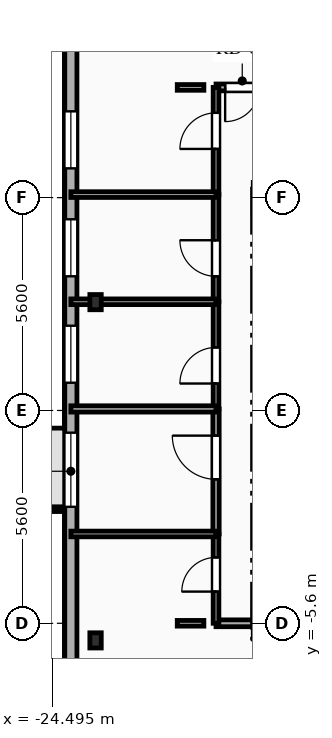
"""IFC4 building model, lengths in metres.
Left out: names, types, materials, properties, quantities, classifications, styles, units other than length and angle.
Written with IfcOpenShell. Run it as: python <this file> out.ifc"""

import sys

from ifc_helpers import new_model, si_unit, direction, frame, frame_2d, origin, origin_2d, place, context, subcontext, project, spatial, rectangle, i_section, extrude, element, fill, save


model = new_model("IFC4")
c1 = context("Model", 3, precision=1e-05, world=origin(), true_north=direction((0.0, 1.0)))
c2 = subcontext(c1, "Body", "Model", "MODEL_VIEW")
j1 = project(units=[si_unit("LENGTHUNIT", "METRE"), si_unit("PLANEANGLEUNIT", "RADIAN")], contexts=[c1])
p1 = place(None, origin())
s1 = spatial("IfcSite", under=j1, at=p1, CompositionType="ELEMENT")
p2 = place(p1, origin())
s2 = spatial("IfcBuilding", under=s1, at=p2, CompositionType="ELEMENT")
p3 = place(p2, frame((0.0, 0.0, 248.4)))
s3 = spatial("IfcBuildingStorey", under=s2, at=p3, CompositionType="ELEMENT", Elevation=248.4)
for number, where, z_axis, x_axis in (
    (1, (-23.35, 2.85, 0.0), (0.0, 0.0, 1.0), (1.0, 0.0, 0.0)),
    (2, (-23.35, -6.05, 0.0), (0.0, 0.0, 1.0), (1.0, 0.0, 0.0)),
):
    element("IfcColumn", number, at=place(p3, frame(where, z_axis=z_axis, x_axis=x_axis)), inside=s3, PredefinedType="COLUMN", context=c2, shape_type="SweptSolid", body=[
        extrude(i_section(OverallWidth=0.3, OverallDepth=0.4, WebThickness=0.013, FlangeThickness=0.024, FilletRadius=0.027, at=origin_2d()), origin(), (0.0, 0.0, 1.0), 3.35),
    ])
p4 = place(p3, frame((-24.0, -15.6, 0.0), z_axis=(0.0, 0.0, 1.0), x_axis=(0.0, 1.0, 0.0)))
e3 = element("IfcWall", 3, at=p4, inside=s3, PredefinedType="SOLIDWALL", context=c2, shape_type="SweptSolid", body=[
    extrude(rectangle(XDim=28.0, YDim=0.32, at=frame_2d((14.0, 0.0))), origin(), (0.0, 0.0, 1.0), 3.04),
])
p5 = place(p4, frame((13.065, 0.0, 0.85)))
e4 = element("IfcOpeningElement", 4, at=p5, cuts=e3, PredefinedType="OPENING", context=c2, shape_type="SweptSolid", body=[
    extrude(rectangle(XDim=1.95, YDim=1.85, at=frame_2d((0.975, 0.925))), frame((0.0, 0.17, 0.0), z_axis=(0.0, -1.0, 0.0), x_axis=(1.0, 0.0, 0.0)), (0.0, 0.0, 1.0), 0.34),
])
p6 = place(p4, frame((16.33, 0.0, 0.85)))
e5 = element("IfcOpeningElement", 5, at=p6, cuts=e3, PredefinedType="OPENING", context=c2, shape_type="SweptSolid", body=[
    extrude(rectangle(XDim=1.5, YDim=1.85, at=frame_2d((0.75, 0.925))), frame((0.0, 0.17, 0.0), z_axis=(0.0, -1.0, 0.0), x_axis=(1.0, 0.0, 0.0)), (0.0, 0.0, 1.0), 0.34),
])
p7 = place(p4, frame((19.13, 0.0, 0.85)))
e6 = element("IfcOpeningElement", 6, at=p7, cuts=e3, PredefinedType="OPENING", context=c2, shape_type="SweptSolid", body=[
    extrude(rectangle(XDim=1.5, YDim=1.85, at=frame_2d((0.75, 0.925))), frame((0.0, 0.17, 0.0), z_axis=(0.0, -1.0, 0.0), x_axis=(1.0, 0.0, 0.0)), (0.0, 0.0, 1.0), 0.34),
])
p8 = place(p4, frame((21.97, 0.0, 0.85)))
e7 = element("IfcOpeningElement", 7, at=p8, cuts=e3, PredefinedType="OPENING", context=c2, shape_type="SweptSolid", body=[
    extrude(rectangle(XDim=1.5, YDim=1.85, at=frame_2d((0.75, 0.925))), frame((0.0, 0.17, 0.0), z_axis=(0.0, -1.0, 0.0), x_axis=(1.0, 0.0, 0.0)), (0.0, 0.0, 1.0), 0.34),
])
p9 = place(p3, frame((-18.8, 8.5, 0.0), z_axis=(0.0, 0.0, 1.0), x_axis=(-1.0, 0.0, 0.0)))
e8 = element("IfcWall", 8, at=p9, inside=s3, PredefinedType="PARTITIONING", context=c2, shape_type="SweptSolid", body=[
    extrude(rectangle(XDim=1.38, YDim=0.18, at=frame_2d((0.69, 0.0))), origin(), (0.0, 0.0, 1.0), 3.04),
])
p10 = place(p9, frame((0.24, 0.0, 0.0)))
e9 = element("IfcOpeningElement", 9, at=p10, cuts=e8, PredefinedType="OPENING", context=c2, shape_type="SweptSolid", body=[
    extrude(rectangle(XDim=0.9, YDim=2.1, at=frame_2d((0.45, 1.05))), frame((0.0, 0.1, 0.0), z_axis=(0.0, -1.0, 0.0), x_axis=(1.0, 0.0, 0.0)), (0.0, 0.0, 1.0), 0.2),
])
p11 = place(p3, frame((-20.5, 8.5, 0.0), z_axis=(0.0, 0.0, 1.0), x_axis=(-1.0, 0.0, 0.0)))
e10 = element("IfcWall", 10, at=p11, inside=s3, PredefinedType="PARTITIONING", context=c2, shape_type="SweptSolid", body=[
    extrude(rectangle(XDim=0.7, YDim=0.15, at=frame_2d((0.35, 0.0))), origin(), (0.0, 0.0, 1.0), 3.04),
])
p12 = place(p3, frame((-20.18, -5.6, 0.0), z_axis=(0.0, 0.0, 1.0), x_axis=(1.0, 0.0, 0.0)))
e11 = element("IfcWall", 11, at=p12, inside=s3, PredefinedType="PARTITIONING", context=c2, shape_type="SweptSolid", body=[
    extrude(rectangle(XDim=1.38, YDim=0.18, at=frame_2d((0.69, 0.0))), origin(), (0.0, 0.0, 1.0), 3.04),
])
p13 = place(p3, frame((-21.2, -5.6, 0.0), z_axis=(0.0, 0.0, 1.0), x_axis=(1.0, 0.0, 0.0)))
e12 = element("IfcWall", 12, at=p13, inside=s3, PredefinedType="PLUMBINGWALL", context=c2, shape_type="SweptSolid", body=[
    extrude(rectangle(XDim=0.7, YDim=0.15, at=frame_2d((0.35, 0.0))), origin(), (0.0, 0.0, 1.0), 3.04),
])
p14 = place(p3, frame((-20.18, -5.6, 0.0), z_axis=(0.0, 0.0, 1.0), x_axis=(0.0, 1.0, 0.0)))
e13 = element("IfcWall", 13, at=p14, inside=s3, PredefinedType="PLUMBINGWALL", context=c2, shape_type="SweptSolid", body=[
    extrude(rectangle(XDim=2.35, YDim=0.15, at=frame_2d((1.175, 0.0))), origin(), (0.0, 0.0, 1.0), 3.04),
])
p15 = place(p14, frame((0.834, 0.0, 0.0)))
e14 = element("IfcOpeningElement", 14, at=p15, cuts=e13, PredefinedType="OPENING", context=c2, shape_type="SweptSolid", body=[
    extrude(rectangle(XDim=0.9, YDim=2.1, at=frame_2d((0.45, 1.05))), frame((0.0, 0.085, 0.0), z_axis=(0.0, -1.0, 0.0), x_axis=(1.0, 0.0, 0.0)), (0.0, 0.0, 1.0), 0.17),
])
p16 = place(p3, frame((-20.18, -3.25, 0.0), z_axis=(0.0, 0.0, 1.0), x_axis=(0.0, 1.0, 0.0)))
e15 = element("IfcWall", 15, at=p16, inside=s3, PredefinedType="PARTITIONING", context=c2, shape_type="SweptSolid", body=[
    extrude(rectangle(XDim=3.29, YDim=0.165, at=frame_2d((1.645, 0.0))), origin(), (0.0, 0.0, 1.0), 3.04),
])
p17 = place(p16, frame((1.438, 0.0, 0.0)))
e16 = element("IfcOpeningElement", 16, at=p17, cuts=e15, PredefinedType="OPENING", context=c2, shape_type="SweptSolid", body=[
    extrude(rectangle(XDim=1.15, YDim=2.15, at=frame_2d((0.575, 1.075))), frame((0.0, 0.093, 0.0), z_axis=(0.0, -1.0, 0.0), x_axis=(1.0, 0.0, 0.0)), (0.0, 0.0, 1.0), 0.185),
])
p18 = place(p3, frame((-20.18, 0.04, 0.0), z_axis=(0.0, 0.0, 1.0), x_axis=(0.0, 1.0, 0.0)))
e17 = element("IfcWall", 17, at=p18, inside=s3, PredefinedType="PARTITIONING", context=c2, shape_type="SweptSolid", body=[
    extrude(rectangle(XDim=2.82, YDim=0.15, at=frame_2d((1.41, 0.0))), origin(), (0.0, 0.0, 1.0), 3.04),
])
p19 = place(p18, frame((0.669, 0.0, 0.0)))
e18 = element("IfcOpeningElement", 18, at=p19, cuts=e17, PredefinedType="OPENING", context=c2, shape_type="SweptSolid", body=[
    extrude(rectangle(XDim=0.95, YDim=2.1, at=frame_2d((0.475, 1.05))), frame((0.0, 0.085, 0.0), z_axis=(0.0, -1.0, 0.0), x_axis=(1.0, 0.0, 0.0)), (0.0, 0.0, 1.0), 0.17),
])
p20 = place(p3, frame((-20.18, 2.86, 0.0), z_axis=(0.0, 0.0, 1.0), x_axis=(0.0, 1.0, 0.0)))
e19 = element("IfcWall", 19, at=p20, inside=s3, PredefinedType="PARTITIONING", context=c2, shape_type="SweptSolid", body=[
    extrude(rectangle(XDim=2.82, YDim=0.15, at=frame_2d((1.41, 0.0))), origin(), (0.0, 0.0, 1.0), 3.04),
])
p21 = place(p20, frame((0.669, 0.0, 0.0)))
e20 = element("IfcOpeningElement", 20, at=p21, cuts=e19, PredefinedType="OPENING", context=c2, shape_type="SweptSolid", body=[
    extrude(rectangle(XDim=0.95, YDim=2.1, at=frame_2d((0.475, 1.05))), frame((0.0, 0.085, 0.0), z_axis=(0.0, -1.0, 0.0), x_axis=(1.0, 0.0, 0.0)), (0.0, 0.0, 1.0), 0.17),
])
p22 = place(p3, frame((-20.18, 5.68, 0.0), z_axis=(0.0, 0.0, 1.0), x_axis=(0.0, 1.0, 0.0)))
e21 = element("IfcWall", 21, at=p22, inside=s3, PredefinedType="PARTITIONING", context=c2, shape_type="SweptSolid", body=[
    extrude(rectangle(XDim=2.82, YDim=0.15, at=frame_2d((1.41, 0.0))), origin(), (0.0, 0.0, 1.0), 3.04),
])
p23 = place(p22, frame((1.201, 0.0, 0.0)))
e22 = element("IfcOpeningElement", 22, at=p23, cuts=e21, PredefinedType="OPENING", context=c2, shape_type="SweptSolid", body=[
    extrude(rectangle(XDim=0.95, YDim=2.1, at=frame_2d((0.475, 1.05))), frame((0.0, 0.085, 0.0), z_axis=(0.0, -1.0, 0.0), x_axis=(1.0, 0.0, 0.0)), (0.0, 0.0, 1.0), 0.17),
])
p24 = place(p3, frame((-24.0, -3.25, 0.0), z_axis=(0.0, 0.0, 1.0), x_axis=(1.0, 0.0, 0.0)))
e23 = element("IfcWall", 23, at=p24, inside=s3, PredefinedType="PLUMBINGWALL", context=c2, shape_type="SweptSolid", body=[
    extrude(rectangle(XDim=3.82, YDim=0.15, at=frame_2d((1.91, 0.0))), origin(), (0.0, 0.0, 1.0), 3.04),
])
p25 = place(p3, frame((-24.0, 0.04, 0.0), z_axis=(0.0, 0.0, 1.0), x_axis=(1.0, 0.0, 0.0)))
e24 = element("IfcWall", 24, at=p25, inside=s3, PredefinedType="PARTITIONING", context=c2, shape_type="SweptSolid", body=[
    extrude(rectangle(XDim=3.82, YDim=0.165, at=frame_2d((1.91, 0.0))), origin(), (0.0, 0.0, 1.0), 3.04),
])
p26 = place(p3, frame((-24.0, 2.86, 0.0), z_axis=(0.0, 0.0, 1.0), x_axis=(1.0, 0.0, 0.0)))
e25 = element("IfcWall", 25, at=p26, inside=s3, PredefinedType="PARTITIONING", context=c2, shape_type="SweptSolid", body=[
    extrude(rectangle(XDim=3.82, YDim=0.15, at=frame_2d((1.91, 0.0))), origin(), (0.0, 0.0, 1.0), 2.665),
])
p27 = place(p3, frame((-24.0, 5.68, 0.0), z_axis=(0.0, 0.0, 1.0), x_axis=(1.0, 0.0, 0.0)))
e26 = element("IfcWall", 26, at=p27, inside=s3, PredefinedType="PARTITIONING", context=c2, shape_type="SweptSolid", body=[
    extrude(rectangle(XDim=3.82, YDim=0.15, at=frame_2d((1.91, 0.0))), origin(), (0.0, 0.0, 1.0), 3.04),
])
p28 = place(p5, origin())
e27 = element("IfcWindow", 27, at=p28, inside=s3, PartitioningType="SINGLE_PANEL", PredefinedType="WINDOW", context=c2, shape_type="SweptSolid", body=[
    extrude(rectangle(XDim=1.95, YDim=1.85, at=frame_2d((0.975, 0.925))), frame((0.0, 0.03, 0.0), z_axis=(0.0, -1.0, 0.0), x_axis=(1.0, 0.0, 0.0)), (0.0, 0.0, 1.0), 0.06),
])
fill(e4, e27)
p29 = place(p6, origin())
e28 = element("IfcWindow", 28, at=p29, inside=s3, PartitioningType="SINGLE_PANEL", PredefinedType="WINDOW", context=c2, shape_type="SweptSolid", body=[
    extrude(rectangle(XDim=1.5, YDim=1.85, at=frame_2d((0.75, 0.925))), frame((0.0, 0.03, 0.0), z_axis=(0.0, -1.0, 0.0), x_axis=(1.0, 0.0, 0.0)), (0.0, 0.0, 1.0), 0.06),
])
fill(e5, e28)
p30 = place(p7, origin())
e29 = element("IfcWindow", 29, at=p30, inside=s3, PartitioningType="SINGLE_PANEL", PredefinedType="WINDOW", context=c2, shape_type="SweptSolid", body=[
    extrude(rectangle(XDim=1.5, YDim=1.85, at=frame_2d((0.75, 0.925))), frame((0.0, 0.03, 0.0), z_axis=(0.0, -1.0, 0.0), x_axis=(1.0, 0.0, 0.0)), (0.0, 0.0, 1.0), 0.06),
])
fill(e6, e29)
p31 = place(p8, origin())
e30 = element("IfcWindow", 30, at=p31, inside=s3, PartitioningType="SINGLE_PANEL", PredefinedType="WINDOW", context=c2, shape_type="SweptSolid", body=[
    extrude(rectangle(XDim=1.5, YDim=1.85, at=frame_2d((0.75, 0.925))), frame((0.0, 0.03, 0.0), z_axis=(0.0, -1.0, 0.0), x_axis=(1.0, 0.0, 0.0)), (0.0, 0.0, 1.0), 0.06),
])
fill(e7, e30)
p32 = place(p10, origin())
e31 = element("IfcDoor", 31, at=p32, inside=s3, OperationType="SINGLE_SWING_RIGHT", PredefinedType="DOOR", context=c2, shape_type="SweptSolid", body=[
    extrude(rectangle(XDim=0.9, YDim=2.1, at=frame_2d((0.45, 1.05))), frame((0.0, 0.025, 0.0), z_axis=(0.0, -1.0, 0.0), x_axis=(1.0, 0.0, 0.0)), (0.0, 0.0, 1.0), 0.05),
])
fill(e9, e31)
p33 = place(p15, origin())
e32 = element("IfcDoor", 32, at=p33, inside=s3, OperationType="SINGLE_SWING_LEFT", PredefinedType="DOOR", context=c2, shape_type="SweptSolid", body=[
    extrude(rectangle(XDim=0.9, YDim=2.1, at=frame_2d((0.45, 1.05))), frame((0.0, 0.025, 0.0), z_axis=(0.0, -1.0, 0.0), x_axis=(1.0, 0.0, 0.0)), (0.0, 0.0, 1.0), 0.05),
])
fill(e14, e32)
p34 = place(p17, origin())
e33 = element("IfcDoor", 33, at=p34, inside=s3, OperationType="SINGLE_SWING_RIGHT", PredefinedType="DOOR", context=c2, shape_type="SweptSolid", body=[
    extrude(rectangle(XDim=1.15, YDim=2.15, at=frame_2d((0.575, 1.075))), frame((0.0, 0.025, 0.0), z_axis=(0.0, -1.0, 0.0), x_axis=(1.0, 0.0, 0.0)), (0.0, 0.0, 1.0), 0.05),
])
fill(e16, e33)
p35 = place(p19, origin())
e34 = element("IfcDoor", 34, at=p35, inside=s3, OperationType="SINGLE_SWING_LEFT", PredefinedType="DOOR", context=c2, shape_type="SweptSolid", body=[
    extrude(rectangle(XDim=0.95, YDim=2.1, at=frame_2d((0.475, 1.05))), frame((0.0, 0.025, 0.0), z_axis=(0.0, -1.0, 0.0), x_axis=(1.0, 0.0, 0.0)), (0.0, 0.0, 1.0), 0.05),
])
fill(e18, e34)
p36 = place(p21, origin())
e35 = element("IfcDoor", 35, at=p36, inside=s3, OperationType="SINGLE_SWING_RIGHT", PredefinedType="DOOR", context=c2, shape_type="SweptSolid", body=[
    extrude(rectangle(XDim=0.95, YDim=2.1, at=frame_2d((0.475, 1.05))), frame((0.0, 0.025, 0.0), z_axis=(0.0, -1.0, 0.0), x_axis=(1.0, 0.0, 0.0)), (0.0, 0.0, 1.0), 0.05),
])
fill(e20, e35)
p37 = place(p23, origin())
e36 = element("IfcDoor", 36, at=p37, inside=s3, OperationType="SINGLE_SWING_LEFT", PredefinedType="DOOR", context=c2, shape_type="SweptSolid", body=[
    extrude(rectangle(XDim=0.95, YDim=2.1, at=frame_2d((0.475, 1.05))), frame((0.0, 0.025, 0.0), z_axis=(0.0, -1.0, 0.0), x_axis=(1.0, 0.0, 0.0)), (0.0, 0.0, 1.0), 0.05),
])
fill(e22, e36)
save(model, sys.argv[1])
